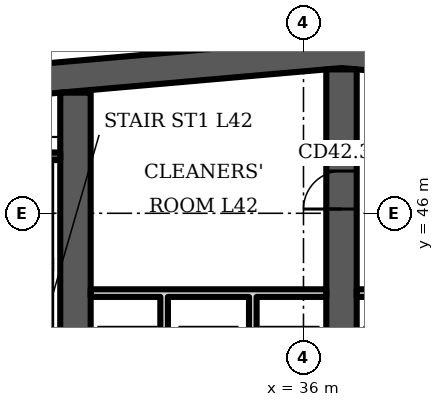
"""IFC4 building model, lengths in metres.
Left out: names, types, materials, properties, quantities, classifications, styles, units other than length and angle.
Written with IfcOpenShell. Run it as: python <this file> out.ifc"""

import sys

from ifc_helpers import new_model, si_unit, direction, frame, frame_2d, origin, place, context, subcontext, project, spatial, polyline, rectangle, outline, extrude, element, fill, save


model = new_model("IFC4")
c1 = context("Model", 3, precision=1e-05, world=origin(), true_north=direction((0.0, 1.0)))
c2 = subcontext(c1, "Body", "Model", "MODEL_VIEW")
j1 = project(units=[si_unit("LENGTHUNIT", "METRE"), si_unit("PLANEANGLEUNIT", "RADIAN")], contexts=[c1])
p1 = place(None, origin())
s1 = spatial("IfcSite", under=j1, at=p1, CompositionType="ELEMENT")
p2 = place(p1, origin())
s2 = spatial("IfcBuilding", under=s1, at=p2, CompositionType="ELEMENT")
p3 = place(p2, frame((0.0, 0.0, 173.5)))
s3 = spatial("IfcBuildingStorey", under=s2, at=p3, CompositionType="ELEMENT", Elevation=173.5)
p4 = place(p3, origin())
e1 = element("IfcWall", 1, at=p4, inside=s3, PredefinedType="SHEAR", context=c2, shape_type="SweptSolid", body=[
    extrude(outline(polyline([(16.0, 47.984), (37.0, 49.822), (58.0, 47.984), (58.0, 48.787), (37.0, 50.625), (16.0, 48.787), (16.0, 47.984)])), origin(), (0.0, 0.0, 1.0), 3.6),
])
p5 = place(p3, frame((30.0, 34.8, 0.0), z_axis=(0.0, 0.0, 1.0), x_axis=(0.0, 1.0, 0.0)))
e2 = element("IfcWall", 2, at=p5, inside=s3, PredefinedType="SHEAR", context=c2, shape_type="SweptSolid", body=[
    extrude(rectangle(XDim=14.374, YDim=0.8, at=frame_2d((7.187, 0.0))), origin(), (0.0, 0.0, 1.0), 3.6),
])
p6 = place(p5, frame((3.6, 0.0, 0.0)))
e3 = element("IfcOpeningElement", 3, at=p6, cuts=e2, PredefinedType="OPENING", context=c2, shape_type="SweptSolid", body=[
    extrude(rectangle(XDim=1.1, YDim=2.1, at=frame_2d((0.55, 1.05))), frame((0.0, 0.41, 0.0), z_axis=(0.0, -1.0, 0.0), x_axis=(1.0, 0.0, 0.0)), (0.0, 0.0, 1.0), 0.82),
])
p7 = place(p3, frame((37.0, 34.8, 0.0), z_axis=(0.0, 0.0, 1.0), x_axis=(0.0, 1.0, 0.0)))
e4 = element("IfcWall", 4, at=p7, inside=s3, PredefinedType="SHEAR", context=c2, shape_type="SweptSolid", body=[
    extrude(rectangle(XDim=14.987, YDim=0.8, at=frame_2d((7.493, 0.0))), origin(), (0.0, 0.0, 1.0), 3.6),
])
p8 = place(p7, frame((11.312, 0.0, 0.0)))
e5 = element("IfcOpeningElement", 5, at=p8, cuts=e4, PredefinedType="OPENING", context=c2, shape_type="SweptSolid", body=[
    extrude(rectangle(XDim=1.0, YDim=2.1, at=frame_2d((0.5, 1.05))), frame((0.0, 0.41, 0.0), z_axis=(0.0, -1.0, 0.0), x_axis=(1.0, 0.0, 0.0)), (0.0, 0.0, 1.0), 0.82),
])
p9 = place(p7, frame((3.6, 0.0, 0.0)))
e6 = element("IfcOpeningElement", 6, at=p9, cuts=e4, PredefinedType="OPENING", context=c2, shape_type="SweptSolid", body=[
    extrude(rectangle(XDim=1.1, YDim=2.1, at=frame_2d((0.55, 1.05))), frame((0.0, 0.41, 0.0), z_axis=(0.0, -1.0, 0.0), x_axis=(1.0, 0.0, 0.0)), (0.0, 0.0, 1.0), 0.82),
])
p10 = place(p3, frame((25.75, 47.5, 0.0), z_axis=(0.0, 0.0, 1.0), x_axis=(1.0, 0.0, 0.0)))
e7 = element("IfcWall", 7, at=p10, inside=s3, PredefinedType="SHEAR", context=c2, shape_type="SweptSolid", body=[
    extrude(rectangle(XDim=3.85, YDim=0.2, at=frame_2d((1.925, 0.0))), origin(), (0.0, 0.0, 1.0), 3.2),
])
p11 = place(p3, frame((0.0, 0.0, -0.0)))
e8 = element("IfcWall", 8, at=p11, inside=s3, PredefinedType="PARTITIONING", context=c2, shape_type="SweptSolid", body=[
    extrude(outline(polyline([(32.433, 40.8), (32.233, 40.8), (32.233, 43.8), (30.4, 43.8), (30.4, 44.0), (36.6, 44.0), (36.6, 43.8), (34.767, 43.8), (34.767, 40.8), (34.567, 40.8), (34.567, 43.8), (32.433, 43.8), (32.433, 40.8)])), origin(), (0.0, 0.0, 1.0), 3.2),
])
p12 = place(p3, frame((0.0, 0.0, -0.0)))
e9 = element("IfcWall", 9, at=p12, inside=s3, PredefinedType="PARTITIONING", context=c2, shape_type="SweptSolid", body=[
    extrude(outline(polyline([(39.433, 40.8), (39.233, 40.8), (39.233, 43.8), (37.4, 43.8), (37.4, 44.0), (43.6, 44.0), (43.6, 43.8), (41.767, 43.8), (41.767, 40.8), (41.567, 40.8), (41.567, 43.8), (39.433, 43.8), (39.433, 40.8)])), origin(), (0.0, 0.0, 1.0), 3.2),
])
p13 = place(p8, origin())
e10 = element("IfcDoor", 10, at=p13, inside=s3, OperationType="SINGLE_SWING_LEFT", PredefinedType="DOOR", context=c2, shape_type="SweptSolid", body=[
    extrude(rectangle(XDim=1.0, YDim=2.1, at=frame_2d((0.5, 1.05))), frame((0.0, 0.4, 0.0), z_axis=(0.0, -1.0, 0.0), x_axis=(1.0, 0.0, 0.0)), (0.0, 0.0, 1.0), 0.8),
])
fill(e5, e10)
save(model, sys.argv[1])
